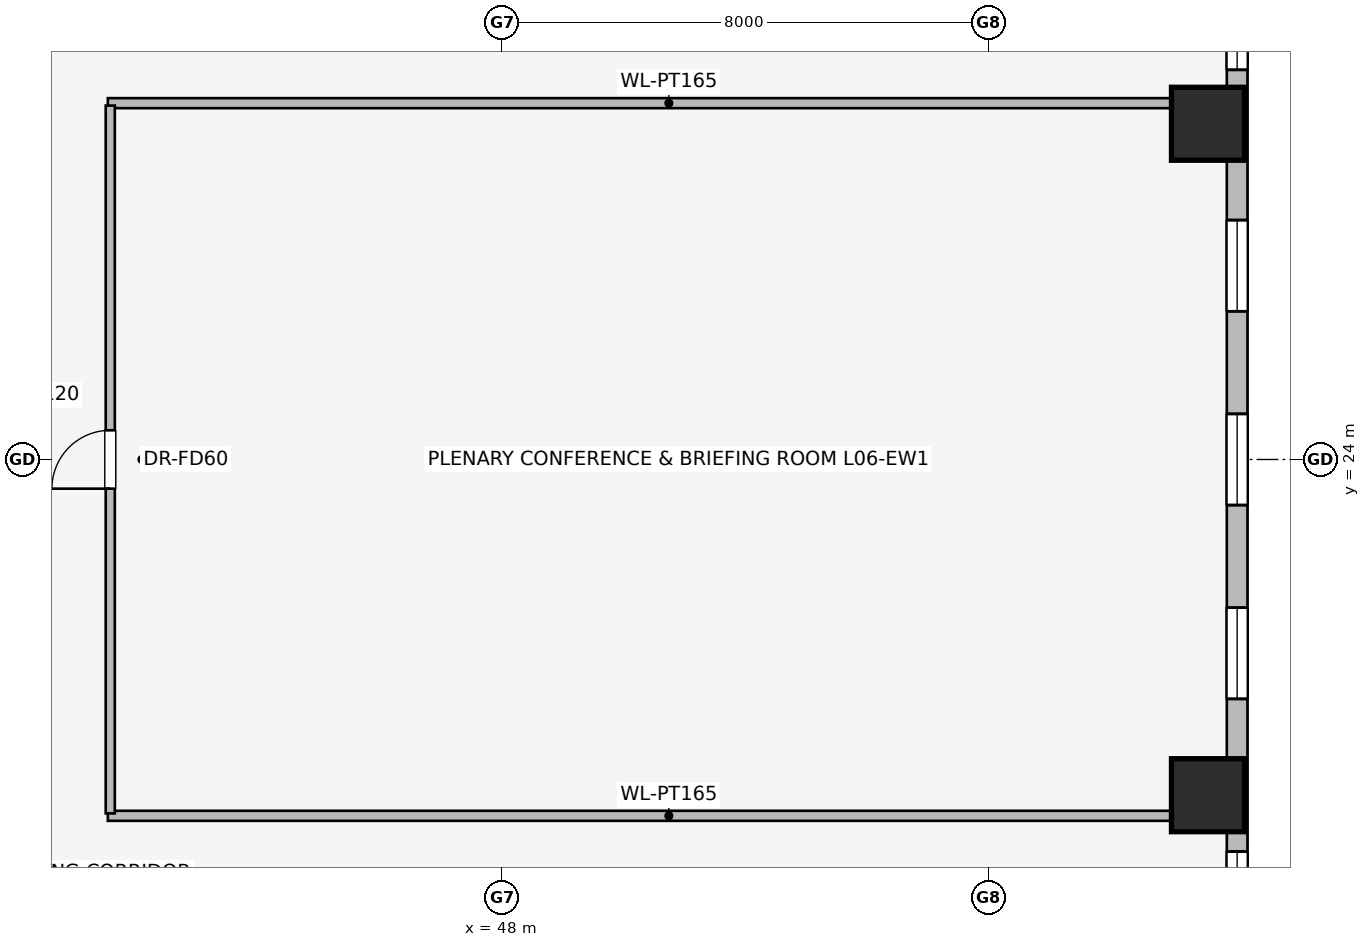
"""IFC4 building model, lengths in metres.
Left out: names, types, materials, properties, quantities, classifications, styles, units other than length and angle.
Written with IfcOpenShell. Run it as: python <this file> out.ifc"""

import sys

from ifc_helpers import new_model, si_unit, direction, frame, frame_2d, origin, origin_2d, place, context, subcontext, project, spatial, rectangle, extrude, element, fill, save


model = new_model("IFC4")
c1 = context("Model", 3, precision=1e-05, world=origin(), true_north=direction((0.0, 1.0)))
c2 = subcontext(c1, "Body", "Model", "MODEL_VIEW")
j1 = project(units=[si_unit("LENGTHUNIT", "METRE"), si_unit("PLANEANGLEUNIT", "RADIAN")], contexts=[c1])
p1 = place(None, origin())
s1 = spatial("IfcSite", under=j1, at=p1, CompositionType="ELEMENT")
p2 = place(p1, origin())
s2 = spatial("IfcBuilding", under=s1, at=p2, CompositionType="ELEMENT")
p3 = place(p2, frame((0.0, 0.0, 27.0)))
s3 = spatial("IfcBuildingStorey", under=s2, at=p3, CompositionType="ELEMENT", Elevation=27.0)
for number, where, z_axis, x_axis in (
    (1, (59.613, 18.479, -0.42), (0.0, 0.0, 1.0), (1.0, 0.0, 0.0)),
    (2, (59.613, 29.521, -0.42), (0.0, 0.0, 1.0), (1.0, 0.0, 0.0)),
):
    element("IfcColumn", number, at=place(p3, frame(where, z_axis=z_axis, x_axis=x_axis)), inside=s3, PredefinedType="COLUMN", context=c2, shape_type="SweptSolid", body=[
        extrude(rectangle(XDim=1.2, YDim=1.2, at=origin_2d()), origin(), (0.0, 0.0, 1.0), 4.07),
    ])
p4 = place(p3, frame((60.093, 33.202, 0.0), z_axis=(0.0, 0.0, 1.0), x_axis=(0.0, -1.0, 0.0)))
e3 = element("IfcWall", 3, at=p4, inside=s3, PredefinedType="STANDARD", context=c2, shape_type="SweptSolid", body=[
    extrude(rectangle(XDim=18.404, YDim=0.34, at=frame_2d((9.202, 0.0))), origin(), (0.0, 0.0, 1.0), 2.684),
])
p5 = place(p4, frame((1.744, 0.0, 0.75)))
e4 = element("IfcOpeningElement", 4, at=p5, cuts=e3, PredefinedType="OPENING", context=c2, shape_type="SweptSolid", body=[
    extrude(rectangle(XDim=1.05, YDim=1.4, at=frame_2d((0.525, 0.7))), frame((0.0, 0.18, 0.0), z_axis=(0.0, -1.0, 0.0), x_axis=(1.0, 0.0, 0.0)), (0.0, 0.0, 1.0), 0.36),
])
p6 = place(p4, frame((5.265, 0.0, 0.75)))
e5 = element("IfcOpeningElement", 5, at=p6, cuts=e3, PredefinedType="OPENING", context=c2, shape_type="SweptSolid", body=[
    extrude(rectangle(XDim=1.5, YDim=1.5, at=frame_2d((0.75, 0.75))), frame((0.0, 0.18, 0.0), z_axis=(0.0, -1.0, 0.0), x_axis=(1.0, 0.0, 0.0)), (0.0, 0.0, 1.0), 0.36),
])
p7 = place(p4, frame((8.452, 0.0, 0.75)))
e6 = element("IfcOpeningElement", 6, at=p7, cuts=e3, PredefinedType="OPENING", context=c2, shape_type="SweptSolid", body=[
    extrude(rectangle(XDim=1.5, YDim=1.5, at=frame_2d((0.75, 0.75))), frame((0.0, 0.18, 0.0), z_axis=(0.0, -1.0, 0.0), x_axis=(1.0, 0.0, 0.0)), (0.0, 0.0, 1.0), 0.36),
])
p8 = place(p4, frame((11.639, 0.0, 0.75)))
e7 = element("IfcOpeningElement", 7, at=p8, cuts=e3, PredefinedType="OPENING", context=c2, shape_type="SweptSolid", body=[
    extrude(rectangle(XDim=1.5, YDim=1.5, at=frame_2d((0.75, 0.75))), frame((0.0, 0.18, 0.0), z_axis=(0.0, -1.0, 0.0), x_axis=(1.0, 0.0, 0.0)), (0.0, 0.0, 1.0), 0.36),
])
p9 = place(p4, frame((15.65, 0.0, 0.75)))
e8 = element("IfcOpeningElement", 8, at=p9, cuts=e3, PredefinedType="OPENING", context=c2, shape_type="SweptSolid", body=[
    extrude(rectangle(XDim=1.05, YDim=1.4, at=frame_2d((0.525, 0.7))), frame((0.0, 0.18, 0.0), z_axis=(0.0, -1.0, 0.0), x_axis=(1.0, 0.0, 0.0)), (0.0, 0.0, 1.0), 0.36),
])
for number, where, z_axis, x_axis in (
    (9, (41.52, 18.14, 0.0), (0.0, 0.0, 1.0), (1.0, 0.0, 0.0)),
    (10, (41.52, 29.86, 0.0), (0.0, 0.0, 1.0), (1.0, 0.0, 0.0)),
):
    element("IfcWall", number, at=place(p3, frame(where, z_axis=z_axis, x_axis=x_axis)), inside=s3, PredefinedType="PARTITIONING", context=c2, shape_type="SweptSolid", body=[
        extrude(rectangle(XDim=18.453, YDim=0.165, at=frame_2d((9.227, 0.0))), origin(), (0.0, 0.0, 1.0), 3.39),
    ])
p10 = place(p3, frame((41.56, 18.18, 0.0), z_axis=(0.0, 0.0, 1.0), x_axis=(0.0, 1.0, 0.0)))
e11 = element("IfcWall", 11, at=p10, inside=s3, PredefinedType="PARTITIONING", context=c2, shape_type="SweptSolid", body=[
    extrude(rectangle(XDim=11.64, YDim=0.15, at=frame_2d((5.82, 0.0))), origin(), (0.0, 0.0, 1.0), 3.39),
])
p11 = place(p10, frame((5.34, 0.0, 0.0)))
e12 = element("IfcOpeningElement", 12, at=p11, cuts=e11, PredefinedType="OPENING", context=c2, shape_type="SweptSolid", body=[
    extrude(rectangle(XDim=0.96, YDim=2.0, at=frame_2d((0.48, 1.0))), frame((0.0, 0.085, 0.0), z_axis=(0.0, -1.0, 0.0), x_axis=(1.0, 0.0, 0.0)), (0.0, 0.0, 1.0), 0.17),
])
p12 = place(p5, origin())
e13 = element("IfcWindow", 13, at=p12, inside=s3, PartitioningType="SINGLE_PANEL", PredefinedType="WINDOW", context=c2, shape_type="SweptSolid", body=[
    extrude(rectangle(XDim=1.05, YDim=1.4, at=frame_2d((0.525, 0.7))), frame((0.0, 0.03, 0.0), z_axis=(0.0, -1.0, 0.0), x_axis=(1.0, 0.0, 0.0)), (0.0, 0.0, 1.0), 0.06),
])
fill(e4, e13)
p13 = place(p6, origin())
e14 = element("IfcWindow", 14, at=p13, inside=s3, PartitioningType="SINGLE_PANEL", PredefinedType="WINDOW", context=c2, shape_type="SweptSolid", body=[
    extrude(rectangle(XDim=1.5, YDim=1.5, at=frame_2d((0.75, 0.75))), frame((0.0, 0.03, 0.0), z_axis=(0.0, -1.0, 0.0), x_axis=(1.0, 0.0, 0.0)), (0.0, 0.0, 1.0), 0.06),
])
fill(e5, e14)
p14 = place(p7, origin())
e15 = element("IfcWindow", 15, at=p14, inside=s3, PartitioningType="SINGLE_PANEL", PredefinedType="WINDOW", context=c2, shape_type="SweptSolid", body=[
    extrude(rectangle(XDim=1.5, YDim=1.5, at=frame_2d((0.75, 0.75))), frame((0.0, 0.03, 0.0), z_axis=(0.0, -1.0, 0.0), x_axis=(1.0, 0.0, 0.0)), (0.0, 0.0, 1.0), 0.06),
])
fill(e6, e15)
p15 = place(p8, origin())
e16 = element("IfcWindow", 16, at=p15, inside=s3, PartitioningType="SINGLE_PANEL", PredefinedType="WINDOW", context=c2, shape_type="SweptSolid", body=[
    extrude(rectangle(XDim=1.5, YDim=1.5, at=frame_2d((0.75, 0.75))), frame((0.0, 0.03, 0.0), z_axis=(0.0, -1.0, 0.0), x_axis=(1.0, 0.0, 0.0)), (0.0, 0.0, 1.0), 0.06),
])
fill(e7, e16)
p16 = place(p9, origin())
e17 = element("IfcWindow", 17, at=p16, inside=s3, PartitioningType="SINGLE_PANEL", PredefinedType="WINDOW", context=c2, shape_type="SweptSolid", body=[
    extrude(rectangle(XDim=1.05, YDim=1.4, at=frame_2d((0.525, 0.7))), frame((0.0, 0.03, 0.0), z_axis=(0.0, -1.0, 0.0), x_axis=(1.0, 0.0, 0.0)), (0.0, 0.0, 1.0), 0.06),
])
fill(e8, e17)
p17 = place(p11, origin())
e18 = element("IfcDoor", 18, at=p17, inside=s3, OperationType="SINGLE_SWING_LEFT", PredefinedType="DOOR", context=c2, shape_type="SweptSolid", body=[
    extrude(rectangle(XDim=0.96, YDim=2.0, at=frame_2d((0.48, 1.0))), frame((0.0, 0.025, 0.0), z_axis=(0.0, -1.0, 0.0), x_axis=(1.0, 0.0, 0.0)), (0.0, 0.0, 1.0), 0.05),
])
fill(e12, e18)
save(model, sys.argv[1])
